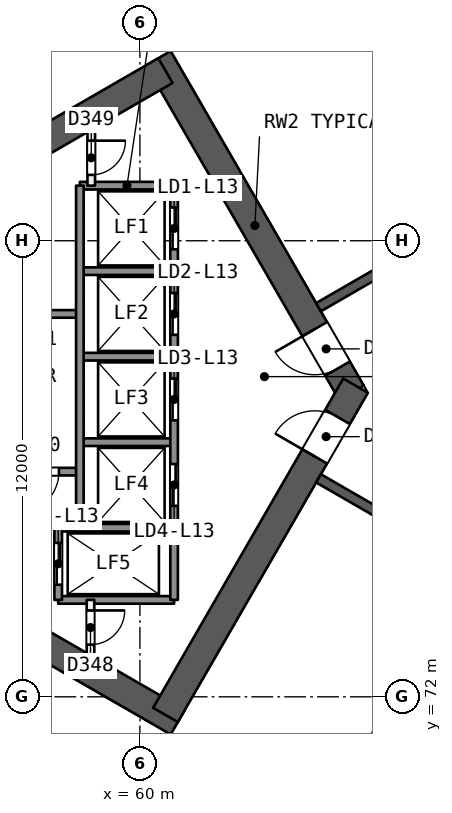
"""IFC4 building model, lengths in metres.
Left out: names, types, materials, properties, quantities, classifications, styles, units other than length and angle.
Written with IfcOpenShell. Run it as: python <this file> out.ifc"""

import sys

from ifc_helpers import new_model, si_unit, direction, frame, frame_2d, origin, place, context, subcontext, project, spatial, rectangle, extrude, element, fill, save


model = new_model("IFC4")
c1 = context("Model", 3, precision=1e-05, world=origin(), true_north=direction((0.0, 1.0)))
c2 = subcontext(c1, "Body", "Model", "MODEL_VIEW")
j1 = project(units=[si_unit("LENGTHUNIT", "METRE"), si_unit("PLANEANGLEUNIT", "RADIAN")], contexts=[c1])
p1 = place(None, origin())
s1 = spatial("IfcSite", under=j1, at=p1, CompositionType="ELEMENT")
p2 = place(p1, origin())
s2 = spatial("IfcBuilding", under=s1, at=p2, CompositionType="ELEMENT")
p3 = place(p2, frame((0.0, 0.0, 61.0)))
s3 = spatial("IfcBuildingStorey", under=s2, at=p3, CompositionType="ELEMENT", Elevation=61.0)
p4 = place(p3, frame((65.567, 80.0, 0.0), z_axis=(0.0, 0.0, 1.0), x_axis=(-0.499988615364, 0.866031976607, 0.0)))
e1 = element("IfcWall", 1, at=p4, inside=s3, PredefinedType="SHEAR", context=c2, shape_type="SweptSolid", body=[
    extrude(rectangle(XDim=10.163, YDim=0.75, at=frame_2d((5.082, 0.0))), origin(), (0.0, 0.0, 1.0), 3.7),
])
p5 = place(p4, frame((0.733, 0.0, 0.0)))
e2 = element("IfcOpeningElement", 2, at=p5, cuts=e1, PredefinedType="OPENING", context=c2, shape_type="SweptSolid", body=[
    extrude(rectangle(XDim=1.2, YDim=2.1, at=frame_2d((0.6, 1.05))), frame((0.0, 0.385, 0.0), z_axis=(0.0, -1.0, 0.0), x_axis=(1.0, 0.0, 0.0)), (0.0, 0.0, 1.0), 0.771),
])
p6 = place(p3, frame((60.673, 88.477, 0.0), z_axis=(0.0, 0.0, 1.0), x_axis=(-0.8660248072, -0.500001033313, 0.0)))
e3 = element("IfcWall", 3, at=p6, inside=s3, PredefinedType="SHEAR", context=c2, shape_type="SweptSolid", body=[
    extrude(rectangle(XDim=13.958, YDim=0.75, at=frame_2d((6.979, 0.0))), origin(), (0.0, 0.0, 1.0), 3.7),
])
p7 = place(p3, frame((48.772, 78.394, 0.0), z_axis=(0.0, 0.0, 1.0), x_axis=(0.866028339916, -0.499994914436, 0.0)))
e4 = element("IfcWall", 4, at=p7, inside=s3, PredefinedType="SHEAR", context=c2, shape_type="SweptSolid", body=[
    extrude(rectangle(XDim=14.117, YDim=0.75, at=frame_2d((7.059, 0.0))), origin(), (0.0, 0.0, 1.0), 3.7),
])
p8 = place(p3, frame((60.673, 71.523, 0.0), z_axis=(0.0, 0.0, 1.0), x_axis=(0.499997052475, 0.866027105532, 0.0)))
e5 = element("IfcWall", 5, at=p8, inside=s3, PredefinedType="SHEAR", context=c2, shape_type="SweptSolid", body=[
    extrude(rectangle(XDim=10.005, YDim=0.75, at=frame_2d((5.002, 0.0))), origin(), (0.0, 0.0, 1.0), 3.7),
])
p9 = place(p8, frame((7.855, 0.0, 0.0)))
e6 = element("IfcOpeningElement", 6, at=p9, cuts=e5, PredefinedType="OPENING", context=c2, shape_type="SweptSolid", body=[
    extrude(rectangle(XDim=1.2, YDim=2.1, at=frame_2d((0.6, 1.05))), frame((0.0, 0.385, 0.0), z_axis=(0.0, -1.0, 0.0), x_axis=(1.0, 0.0, 0.0)), (0.0, 0.0, 1.0), 0.771),
])
p10 = place(p3, frame((78.2, 90.046, 0.0), z_axis=(0.0, 0.0, 1.0), x_axis=(-0.866026492143, -0.499998114903, 0.0)))
e7 = element("IfcWall", 7, at=p10, inside=s3, PredefinedType="SHEAR", context=c2, shape_type="SweptSolid", body=[
    extrude(rectangle(XDim=15.588, YDim=0.25, at=frame_2d((7.794, 0.0))), origin(), (0.0, 0.0, 1.0), 3.2),
])
p11 = place(p10, frame((2.618, 0.0, 0.0)))
e8 = element("IfcOpeningElement", 8, at=p11, cuts=e7, PredefinedType="OPENING", context=c2, shape_type="SweptSolid", body=[
    extrude(rectangle(XDim=1.0, YDim=2.1, at=frame_2d((0.5, 1.05))), frame((0.0, 0.135, 0.0), z_axis=(0.0, -1.0, 0.0), x_axis=(1.0, 0.0, 0.0)), (0.0, 0.0, 1.0), 0.271),
])
p12 = place(p10, frame((8.133, 0.0, 0.0)))
e9 = element("IfcOpeningElement", 9, at=p12, cuts=e7, PredefinedType="OPENING", context=c2, shape_type="SweptSolid", body=[
    extrude(rectangle(XDim=1.0, YDim=2.1, at=frame_2d((0.5, 1.05))), frame((0.0, 0.135, 0.0), z_axis=(0.0, -1.0, 0.0), x_axis=(1.0, 0.0, 0.0)), (0.0, 0.0, 1.0), 0.271),
])
p13 = place(p10, frame((11.971, 0.0, 0.0)))
e10 = element("IfcOpeningElement", 10, at=p13, cuts=e7, PredefinedType="OPENING", context=c2, shape_type="SweptSolid", body=[
    extrude(rectangle(XDim=1.0, YDim=2.1, at=frame_2d((0.5, 1.05))), frame((0.0, 0.135, 0.0), z_axis=(0.0, -1.0, 0.0), x_axis=(1.0, 0.0, 0.0)), (0.0, 0.0, 1.0), 0.271),
])
p14 = place(p3, frame((64.7, 77.748, 0.0), z_axis=(0.0, 0.0, 1.0), x_axis=(0.866026492143, -0.499998114903, 0.0)))
e11 = element("IfcWall", 11, at=p14, inside=s3, PredefinedType="SHEAR", context=c2, shape_type="SweptSolid", body=[
    extrude(rectangle(XDim=15.588, YDim=0.25, at=frame_2d((7.794, 0.0))), origin(), (0.0, 0.0, 1.0), 3.2),
])
p15 = place(p14, frame((1.838, 0.0, 0.0)))
e12 = element("IfcOpeningElement", 12, at=p15, cuts=e11, PredefinedType="OPENING", context=c2, shape_type="SweptSolid", body=[
    extrude(rectangle(XDim=1.0, YDim=2.1, at=frame_2d((0.5, 1.05))), frame((0.0, 0.135, 0.0), z_axis=(0.0, -1.0, 0.0), x_axis=(1.0, 0.0, 0.0)), (0.0, 0.0, 1.0), 0.271),
])
p16 = place(p14, frame((8.694, 0.0, 0.0)))
e13 = element("IfcOpeningElement", 13, at=p16, cuts=e11, PredefinedType="OPENING", context=c2, shape_type="SweptSolid", body=[
    extrude(rectangle(XDim=1.1, YDim=2.1, at=frame_2d((0.55, 1.05))), frame((0.0, 0.135, 0.0), z_axis=(0.0, -1.0, 0.0), x_axis=(1.0, 0.0, 0.0)), (0.0, 0.0, 1.0), 0.271),
])
p17 = place(p14, frame((12.75, 0.0, 0.0)))
e14 = element("IfcOpeningElement", 14, at=p17, cuts=e11, PredefinedType="OPENING", context=c2, shape_type="SweptSolid", body=[
    extrude(rectangle(XDim=1.0, YDim=2.1, at=frame_2d((0.5, 1.05))), frame((0.0, 0.135, 0.0), z_axis=(0.0, -1.0, 0.0), x_axis=(1.0, 0.0, 0.0)), (0.0, 0.0, 1.0), 0.271),
])
for number, where, z_axis, x_axis in (
    (15, (65.988, 98.728, 0.0), (0.0, 0.0, 1.0), (0.5, -0.866, 0.0)),
    (16, (63.287, 97.169, 0.0), (0.0, 0.0, 1.0), (0.5, -0.866, 0.0)),
):
    element("IfcWall", number, at=place(p3, frame(where, z_axis=z_axis, x_axis=x_axis)), inside=s3, PredefinedType="PARTITIONING", context=c2, shape_type="SweptSolid", body=[
        extrude(rectangle(XDim=13.625, YDim=0.2, at=frame_2d((6.812, 0.0))), origin(), (0.0, 0.0, 1.0), 3.2),
    ])
p18 = place(p3, frame((61.938, 63.61, 0.0), z_axis=(0.0, 0.0, 1.0), x_axis=(0.499994284652, 0.866028703517, 0.0)))
e17 = element("IfcWall", 17, at=p18, inside=s3, PredefinedType="PARTITIONING", context=c2, shape_type="SweptSolid", body=[
    extrude(rectangle(XDim=10.625, YDim=0.2, at=frame_2d((5.312, 0.0))), origin(), (0.0, 0.0, 1.0), 3.2),
])
p19 = place(p3, frame((38.571, 83.071, 0.0), z_axis=(0.0, 0.0, 1.0), x_axis=(0.866024926003, 0.500000827541, 0.0)))
e18 = element("IfcWall", 18, at=p19, inside=s3, PredefinedType="SOLIDWALL", context=c2, shape_type="SweptSolid", body=[
    extrude(rectangle(XDim=60.025, YDim=0.3, at=frame_2d((30.013, 0.0))), origin(), (0.0, 0.0, 1.0), 3.2),
])
p20 = place(p19, frame((33.489, 0.0, 0.0)))
e19 = element("IfcOpeningElement", 19, at=p20, cuts=e18, PredefinedType="OPENING", context=c2, shape_type="SweptSolid", body=[
    extrude(rectangle(XDim=2.4, YDim=2.4, at=frame_2d((1.2, 1.2))), frame((0.0, 0.161, 0.0), z_axis=(0.0, -1.0, 0.0), x_axis=(1.0, 0.0, 0.0)), (0.0, 0.0, 1.0), 0.321),
])
p21 = place(p19, frame((46.558, 0.0, 0.0)))
e20 = element("IfcOpeningElement", 20, at=p21, cuts=e18, PredefinedType="OPENING", context=c2, shape_type="SweptSolid", body=[
    extrude(rectangle(XDim=2.4, YDim=2.4, at=frame_2d((1.2, 1.2))), frame((0.0, 0.161, 0.0), z_axis=(0.0, -1.0, 0.0), x_axis=(1.0, 0.0, 0.0)), (0.0, 0.0, 1.0), 0.321),
])
p22 = place(p19, frame((24.136, 0.0, 0.0)))
e21 = element("IfcOpeningElement", 21, at=p22, cuts=e18, PredefinedType="OPENING", context=c2, shape_type="SweptSolid", body=[
    extrude(rectangle(XDim=2.4, YDim=2.4, at=frame_2d((1.2, 1.2))), frame((0.0, 0.161, 0.0), z_axis=(0.0, -1.0, 0.0), x_axis=(1.0, 0.0, 0.0)), (0.0, 0.0, 1.0), 0.321),
])
p23 = place(p19, frame((11.109, 0.0, 0.0)))
e22 = element("IfcOpeningElement", 22, at=p23, cuts=e18, PredefinedType="OPENING", context=c2, shape_type="SweptSolid", body=[
    extrude(rectangle(XDim=2.4, YDim=2.4, at=frame_2d((1.2, 1.2))), frame((0.0, 0.161, 0.0), z_axis=(0.0, -1.0, 0.0), x_axis=(1.0, 0.0, 0.0)), (0.0, 0.0, 1.0), 0.321),
])
p24 = place(p19, frame((28.813, 0.0, 0.0)))
e23 = element("IfcOpeningElement", 23, at=p24, cuts=e18, PredefinedType="OPENING", context=c2, shape_type="SweptSolid", body=[
    extrude(rectangle(XDim=2.4, YDim=2.4, at=frame_2d((1.2, 1.2))), frame((0.0, 0.161, 0.0), z_axis=(0.0, -1.0, 0.0), x_axis=(1.0, 0.0, 0.0)), (0.0, 0.0, 1.0), 0.321),
])
p25 = place(p3, frame((90.555, 46.916, 0.0), z_axis=(0.0, 0.0, 1.0), x_axis=(-0.866024926003, 0.500000827541, 0.0)))
e24 = element("IfcWall", 24, at=p25, inside=s3, PredefinedType="SOLIDWALL", context=c2, shape_type="SweptSolid", body=[
    extrude(rectangle(XDim=60.025, YDim=0.3, at=frame_2d((30.013, 0.0))), origin(), (0.0, 0.0, 1.0), 3.2),
])
p26 = place(p25, frame((28.813, 0.0, 0.0)))
e25 = element("IfcOpeningElement", 25, at=p26, cuts=e24, PredefinedType="OPENING", context=c2, shape_type="SweptSolid", body=[
    extrude(rectangle(XDim=2.4, YDim=2.4, at=frame_2d((1.2, 1.2))), frame((0.0, 0.161, 0.0), z_axis=(0.0, -1.0, 0.0), x_axis=(1.0, 0.0, 0.0)), (0.0, 0.0, 1.0), 0.321),
])
p27 = place(p25, frame((34.269, 0.0, 0.0)))
e26 = element("IfcOpeningElement", 26, at=p27, cuts=e24, PredefinedType="OPENING", context=c2, shape_type="SweptSolid", body=[
    extrude(rectangle(XDim=2.4, YDim=2.4, at=frame_2d((1.2, 1.2))), frame((0.0, 0.161, 0.0), z_axis=(0.0, -1.0, 0.0), x_axis=(1.0, 0.0, 0.0)), (0.0, 0.0, 1.0), 0.321),
])
p28 = place(p25, frame((46.558, 0.0, 0.0)))
e27 = element("IfcOpeningElement", 27, at=p28, cuts=e24, PredefinedType="OPENING", context=c2, shape_type="SweptSolid", body=[
    extrude(rectangle(XDim=2.4, YDim=2.4, at=frame_2d((1.2, 1.2))), frame((0.0, 0.161, 0.0), z_axis=(0.0, -1.0, 0.0), x_axis=(1.0, 0.0, 0.0)), (0.0, 0.0, 1.0), 0.321),
])
p29 = place(p25, frame((23.357, 0.0, 0.0)))
e28 = element("IfcOpeningElement", 28, at=p29, cuts=e24, PredefinedType="OPENING", context=c2, shape_type="SweptSolid", body=[
    extrude(rectangle(XDim=2.4, YDim=2.4, at=frame_2d((1.2, 1.2))), frame((0.0, 0.161, 0.0), z_axis=(0.0, -1.0, 0.0), x_axis=(1.0, 0.0, 0.0)), (0.0, 0.0, 1.0), 0.321),
])
p30 = place(p25, frame((11.109, 0.0, 0.0)))
e29 = element("IfcOpeningElement", 29, at=p30, cuts=e24, PredefinedType="OPENING", context=c2, shape_type="SweptSolid", body=[
    extrude(rectangle(XDim=2.4, YDim=2.4, at=frame_2d((1.2, 1.2))), frame((0.0, 0.161, 0.0), z_axis=(0.0, -1.0, 0.0), x_axis=(1.0, 0.0, 0.0)), (0.0, 0.0, 1.0), 0.321),
])
for number, where, z_axis, x_axis in (
    (30, (60.9, 85.45, 0.0), (0.0, 0.0, 1.0), (-1.0, 0.0, 0.0)),
    (31, (60.9, 83.2, 0.0), (0.0, 0.0, 1.0), (-1.0, 0.0, 0.0)),
):
    element("IfcWall", number, at=place(p3, frame(where, z_axis=z_axis, x_axis=x_axis)), inside=s3, PredefinedType="SOLIDWALL", context=c2, shape_type="SweptSolid", body=[
        extrude(rectangle(XDim=2.48, YDim=0.2, at=frame_2d((1.24, 0.0))), origin(), (0.0, 0.0, 1.0), 3.2),
    ])
p31 = place(p3, frame((58.42, 82.075, 0.0), z_axis=(0.0, 0.0, 1.0), x_axis=(-1.0, 0.0, 0.0)))
e32 = element("IfcWall", 32, at=p31, inside=s3, PredefinedType="SOLIDWALL", context=c2, shape_type="SweptSolid", body=[
    extrude(rectangle(XDim=7.7, YDim=0.2, at=frame_2d((3.85, 0.0))), origin(), (0.0, 0.0, 1.0), 3.2),
])
for number, where, z_axis, x_axis in (
    (33, (60.9, 80.95, 0.0), (0.0, 0.0, 1.0), (-1.0, 0.0, 0.0)),
    (34, (60.9, 78.7, 0.0), (0.0, 0.0, 1.0), (-1.0, 0.0, 0.0)),
):
    element("IfcWall", number, at=place(p3, frame(where, z_axis=z_axis, x_axis=x_axis)), inside=s3, PredefinedType="SOLIDWALL", context=c2, shape_type="SweptSolid", body=[
        extrude(rectangle(XDim=2.48, YDim=0.2, at=frame_2d((1.24, 0.0))), origin(), (0.0, 0.0, 1.0), 3.2),
    ])
p32 = place(p3, frame((58.42, 77.925, 0.0), z_axis=(0.0, 0.0, 1.0), x_axis=(-1.0, 0.0, 0.0)))
e35 = element("IfcWall", 35, at=p32, inside=s3, PredefinedType="SOLIDWALL", context=c2, shape_type="SweptSolid", body=[
    extrude(rectangle(XDim=7.7, YDim=0.2, at=frame_2d((3.85, 0.0))), origin(), (0.0, 0.0, 1.0), 3.2),
])
p33 = place(p32, frame((0.55, 0.0, 0.0)))
e36 = element("IfcOpeningElement", 36, at=p33, cuts=e35, PredefinedType="OPENING", context=c2, shape_type="SweptSolid", body=[
    extrude(rectangle(XDim=1.1, YDim=2.1, at=frame_2d((0.55, 1.05))), frame((0.0, 0.11, 0.0), z_axis=(0.0, -1.0, 0.0), x_axis=(1.0, 0.0, 0.0)), (0.0, 0.0, 1.0), 0.221),
])
for number, where, z_axis, x_axis in (
    (37, (60.9, 76.45, 0.0), (0.0, 0.0, 1.0), (-1.0, 0.0, 0.0)),
    (38, (60.9, 74.55, 0.0), (0.0, 0.0, 1.0), (-1.0, 0.0, 0.0)),
):
    element("IfcWall", number, at=place(p3, frame(where, z_axis=z_axis, x_axis=x_axis)), inside=s3, PredefinedType="SOLIDWALL", context=c2, shape_type="SweptSolid", body=[
        extrude(rectangle(XDim=3.05, YDim=0.2, at=frame_2d((1.525, 0.0))), origin(), (0.0, 0.0, 1.0), 3.2),
    ])
p34 = place(p3, frame((60.9, 85.45, 0.0), z_axis=(0.0, 0.0, 1.0), x_axis=(0.0, -1.0, 0.0)))
e39 = element("IfcWall", 39, at=p34, inside=s3, PredefinedType="SOLIDWALL", context=c2, shape_type="SweptSolid", body=[
    extrude(rectangle(XDim=10.9, YDim=0.2, at=frame_2d((5.45, 0.0))), origin(), (0.0, 0.0, 1.0), 3.2),
])
p35 = place(p34, frame((0.575, 0.0, 0.0)))
e40 = element("IfcOpeningElement", 40, at=p35, cuts=e39, PredefinedType="OPENING", context=c2, shape_type="SweptSolid", body=[
    extrude(rectangle(XDim=1.1, YDim=2.1, at=frame_2d((0.55, 1.05))), frame((0.0, 0.11, 0.0), z_axis=(0.0, -1.0, 0.0), x_axis=(1.0, 0.0, 0.0)), (0.0, 0.0, 1.0), 0.221),
])
p36 = place(p34, frame((2.825, 0.0, 0.0)))
e41 = element("IfcOpeningElement", 41, at=p36, cuts=e39, PredefinedType="OPENING", context=c2, shape_type="SweptSolid", body=[
    extrude(rectangle(XDim=1.1, YDim=2.1, at=frame_2d((0.55, 1.05))), frame((0.0, 0.11, 0.0), z_axis=(0.0, -1.0, 0.0), x_axis=(1.0, 0.0, 0.0)), (0.0, 0.0, 1.0), 0.221),
])
p37 = place(p34, frame((5.075, 0.0, 0.0)))
e42 = element("IfcOpeningElement", 42, at=p37, cuts=e39, PredefinedType="OPENING", context=c2, shape_type="SweptSolid", body=[
    extrude(rectangle(XDim=1.1, YDim=2.1, at=frame_2d((0.55, 1.05))), frame((0.0, 0.11, 0.0), z_axis=(0.0, -1.0, 0.0), x_axis=(1.0, 0.0, 0.0)), (0.0, 0.0, 1.0), 0.221),
])
p38 = place(p34, frame((7.325, 0.0, 0.0)))
e43 = element("IfcOpeningElement", 43, at=p38, cuts=e39, PredefinedType="OPENING", context=c2, shape_type="SweptSolid", body=[
    extrude(rectangle(XDim=1.1, YDim=2.1, at=frame_2d((0.55, 1.05))), frame((0.0, 0.11, 0.0), z_axis=(0.0, -1.0, 0.0), x_axis=(1.0, 0.0, 0.0)), (0.0, 0.0, 1.0), 0.221),
])
p39 = place(p3, frame((58.72, 86.917, 0.0), z_axis=(0.0, 0.0, 1.0), x_axis=(0.0, -1.0, 0.0)))
e44 = element("IfcWall", 44, at=p39, inside=s3, PredefinedType="PARTITIONING", context=c2, shape_type="SweptSolid", body=[
    extrude(rectangle(XDim=1.467, YDim=0.2, at=frame_2d((0.733, 0.0))), origin(), (0.0, 0.0, 1.0), 3.2),
])
p40 = place(p39, frame((0.283, 0.0, 0.0)))
e45 = element("IfcOpeningElement", 45, at=p40, cuts=e44, PredefinedType="OPENING", context=c2, shape_type="SweptSolid", body=[
    extrude(rectangle(XDim=0.9, YDim=2.1, at=frame_2d((0.45, 1.05))), frame((0.0, 0.11, 0.0), z_axis=(0.0, -1.0, 0.0), x_axis=(1.0, 0.0, 0.0)), (0.0, 0.0, 1.0), 0.221),
])
p41 = place(p3, frame((58.7, 74.55, 0.0), z_axis=(0.0, 0.0, 1.0), x_axis=(0.0, -1.0, 0.0)))
e46 = element("IfcWall", 46, at=p41, inside=s3, PredefinedType="PARTITIONING", context=c2, shape_type="SweptSolid", body=[
    extrude(rectangle(XDim=1.455, YDim=0.2, at=frame_2d((0.728, 0.0))), origin(), (0.0, 0.0, 1.0), 3.2),
])
p42 = place(p41, frame((0.278, 0.0, 0.0)))
e47 = element("IfcOpeningElement", 47, at=p42, cuts=e46, PredefinedType="OPENING", context=c2, shape_type="SweptSolid", body=[
    extrude(rectangle(XDim=0.9, YDim=2.1, at=frame_2d((0.45, 1.05))), frame((0.0, 0.11, 0.0), z_axis=(0.0, -1.0, 0.0), x_axis=(1.0, 0.0, 0.0)), (0.0, 0.0, 1.0), 0.221),
])
p43 = place(p3, frame((58.42, 85.45, 0.0), z_axis=(0.0, 0.0, 1.0), x_axis=(0.0, -1.0, 0.0)))
e48 = element("IfcWall", 48, at=p43, inside=s3, PredefinedType="SOLIDWALL", context=c2, shape_type="SweptSolid", body=[
    extrude(rectangle(XDim=9.0, YDim=0.2, at=frame_2d((4.5, 0.0))), origin(), (0.0, 0.0, 1.0), 3.2),
])
p44 = place(p3, frame((57.85, 76.45, 0.0), z_axis=(0.0, 0.0, 1.0), x_axis=(0.0, -1.0, 0.0)))
e49 = element("IfcWall", 49, at=p44, inside=s3, PredefinedType="SOLIDWALL", context=c2, shape_type="SweptSolid", body=[
    extrude(rectangle(XDim=1.9, YDim=0.2, at=frame_2d((0.95, 0.0))), origin(), (0.0, 0.0, 1.0), 3.2),
])
p45 = place(p44, frame((0.4, 0.0, 0.0)))
e50 = element("IfcOpeningElement", 50, at=p45, cuts=e49, PredefinedType="OPENING", context=c2, shape_type="SweptSolid", body=[
    extrude(rectangle(XDim=1.1, YDim=2.1, at=frame_2d((0.55, 1.05))), frame((0.0, 0.11, 0.0), z_axis=(0.0, -1.0, 0.0), x_axis=(1.0, 0.0, 0.0)), (0.0, 0.0, 1.0), 0.221),
])
p46 = place(p5, origin())
e51 = element("IfcDoor", 51, at=p46, inside=s3, OperationType="SINGLE_SWING_RIGHT", PredefinedType="NOTDEFINED", context=c2, shape_type="SweptSolid", body=[
    extrude(rectangle(XDim=1.2, YDim=2.1, at=frame_2d((0.6, 1.05))), frame((0.0, 0.025, 0.0), z_axis=(0.0, -1.0, 0.0), x_axis=(1.0, 0.0, 0.0)), (0.0, 0.0, 1.0), 0.05),
])
fill(e2, e51)
p47 = place(p9, origin())
e52 = element("IfcDoor", 52, at=p47, inside=s3, OperationType="SINGLE_SWING_LEFT", PredefinedType="NOTDEFINED", context=c2, shape_type="SweptSolid", body=[
    extrude(rectangle(XDim=1.2, YDim=2.1, at=frame_2d((0.6, 1.05))), frame((0.0, 0.025, 0.0), z_axis=(0.0, -1.0, 0.0), x_axis=(1.0, 0.0, 0.0)), (0.0, 0.0, 1.0), 0.05),
])
fill(e6, e52)
p48 = place(p35, origin())
e53 = element("IfcDoor", 53, at=p48, inside=s3, OperationType="SLIDING_TO_RIGHT", PredefinedType="NOTDEFINED", context=c2, shape_type="SweptSolid", body=[
    extrude(rectangle(XDim=1.1, YDim=2.1, at=frame_2d((0.55, 1.05))), frame((0.0, 0.025, 0.0), z_axis=(0.0, -1.0, 0.0), x_axis=(1.0, 0.0, 0.0)), (0.0, 0.0, 1.0), 0.05),
])
fill(e40, e53)
p49 = place(p36, origin())
e54 = element("IfcDoor", 54, at=p49, inside=s3, OperationType="SLIDING_TO_LEFT", PredefinedType="NOTDEFINED", context=c2, shape_type="SweptSolid", body=[
    extrude(rectangle(XDim=1.1, YDim=2.1, at=frame_2d((0.55, 1.05))), frame((0.0, 0.025, 0.0), z_axis=(0.0, -1.0, 0.0), x_axis=(1.0, 0.0, 0.0)), (0.0, 0.0, 1.0), 0.05),
])
fill(e41, e54)
p50 = place(p37, origin())
e55 = element("IfcDoor", 55, at=p50, inside=s3, OperationType="SLIDING_TO_RIGHT", PredefinedType="NOTDEFINED", context=c2, shape_type="SweptSolid", body=[
    extrude(rectangle(XDim=1.1, YDim=2.1, at=frame_2d((0.55, 1.05))), frame((0.0, 0.025, 0.0), z_axis=(0.0, -1.0, 0.0), x_axis=(1.0, 0.0, 0.0)), (0.0, 0.0, 1.0), 0.05),
])
fill(e42, e55)
p51 = place(p38, origin())
e56 = element("IfcDoor", 56, at=p51, inside=s3, OperationType="SLIDING_TO_LEFT", PredefinedType="NOTDEFINED", context=c2, shape_type="SweptSolid", body=[
    extrude(rectangle(XDim=1.1, YDim=2.1, at=frame_2d((0.55, 1.05))), frame((0.0, 0.025, 0.0), z_axis=(0.0, -1.0, 0.0), x_axis=(1.0, 0.0, 0.0)), (0.0, 0.0, 1.0), 0.05),
])
fill(e43, e56)
p52 = place(p45, origin())
e57 = element("IfcDoor", 57, at=p52, inside=s3, OperationType="SLIDING_TO_RIGHT", PredefinedType="NOTDEFINED", context=c2, shape_type="SweptSolid", body=[
    extrude(rectangle(XDim=1.1, YDim=2.1, at=frame_2d((0.55, 1.05))), frame((0.0, 0.025, 0.0), z_axis=(0.0, -1.0, 0.0), x_axis=(1.0, 0.0, 0.0)), (0.0, 0.0, 1.0), 0.05),
])
fill(e50, e57)
p53 = place(p42, origin())
e58 = element("IfcDoor", 58, at=p53, inside=s3, OperationType="SINGLE_SWING_LEFT", PredefinedType="NOTDEFINED", context=c2, shape_type="SweptSolid", body=[
    extrude(rectangle(XDim=0.9, YDim=2.1, at=frame_2d((0.45, 1.05))), frame((0.0, 0.025, 0.0), z_axis=(0.0, -1.0, 0.0), x_axis=(1.0, 0.0, 0.0)), (0.0, 0.0, 1.0), 0.05),
])
fill(e47, e58)
p54 = place(p40, origin())
e59 = element("IfcDoor", 59, at=p54, inside=s3, OperationType="SINGLE_SWING_LEFT", PredefinedType="NOTDEFINED", context=c2, shape_type="SweptSolid", body=[
    extrude(rectangle(XDim=0.9, YDim=2.1, at=frame_2d((0.45, 1.05))), frame((0.0, 0.025, 0.0), z_axis=(0.0, -1.0, 0.0), x_axis=(1.0, 0.0, 0.0)), (0.0, 0.0, 1.0), 0.05),
])
fill(e45, e59)
p55 = place(p33, origin())
e60 = element("IfcDoor", 60, at=p55, inside=s3, OperationType="SINGLE_SWING_RIGHT", PredefinedType="NOTDEFINED", context=c2, shape_type="SweptSolid", body=[
    extrude(rectangle(XDim=1.1, YDim=2.1, at=frame_2d((0.55, 1.05))), frame((0.0, 0.025, 0.0), z_axis=(0.0, -1.0, 0.0), x_axis=(1.0, 0.0, 0.0)), (0.0, 0.0, 1.0), 0.05),
])
fill(e36, e60)
save(model, sys.argv[1])
